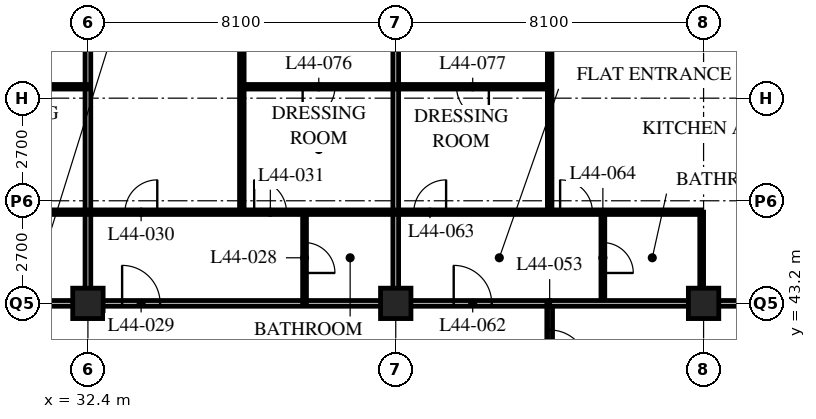
"""IFC4 building model, lengths in metres.
Left out: names, types, materials, properties, quantities, classifications, styles, units other than length and angle.
Written with IfcOpenShell. Run it as: python <this file> out.ifc"""

import sys

from ifc_helpers import new_model, si_unit, direction, frame, frame_2d, origin, origin_2d, place, context, subcontext, project, spatial, rectangle, hollow_rectangle, extrude, element, fill, save


model = new_model("IFC4")
c1 = context("Model", 3, precision=1e-05, world=origin(), true_north=direction((0.0, 1.0)))
c2 = subcontext(c1, "Body", "Model", "MODEL_VIEW")
j1 = project(units=[si_unit("LENGTHUNIT", "METRE"), si_unit("PLANEANGLEUNIT", "RADIAN")], contexts=[c1])
p1 = place(None, origin())
s1 = spatial("IfcSite", under=j1, at=p1, CompositionType="ELEMENT")
p2 = place(p1, origin())
s2 = spatial("IfcBuilding", under=s1, at=p2, CompositionType="ELEMENT")
p3 = place(p2, frame((0.0, 0.0, 174.0)))
s3 = spatial("IfcBuildingStorey", under=s2, at=p3, CompositionType="ELEMENT", Elevation=174.0)
for number, where, z_axis, x_axis in (
    (1, (32.4, 43.2, 0.0), (0.0, 0.0, 1.0), (1.0, 0.0, 0.0)),
    (2, (40.5, 43.2, 0.0), (0.0, 0.0, 1.0), (1.0, 0.0, 0.0)),
    (3, (48.6, 43.2, 0.0), (0.0, 0.0, 1.0), (1.0, 0.0, 0.0)),
):
    element("IfcColumn", number, at=place(p3, frame(where, z_axis=z_axis, x_axis=x_axis)), inside=s3, PredefinedType="COLUMN", context=c2, shape_type="SweptSolid", body=[
        extrude(hollow_rectangle(XDim=0.8, YDim=0.8, WallThickness=0.08, at=origin_2d()), origin(), (0.0, 0.0, 1.0), 3.6),
    ])
p4 = place(p3, frame((12.15, 43.2, 0.0), z_axis=(0.0, 0.0, 1.0), x_axis=(1.0, 0.0, 0.0)))
e4 = element("IfcWall", 4, at=p4, inside=s3, PredefinedType="PARTITIONING", context=c2, shape_type="SweptSolid", body=[
    extrude(rectangle(XDim=32.4, YDim=0.15, at=frame_2d((16.2, 0.0))), origin(), (0.0, 0.0, 1.0), 2.778),
])
p5 = place(p4, frame((4.95, 0.0, 0.0)))
e5 = element("IfcOpeningElement", 5, at=p5, cuts=e4, PredefinedType="OPENING", context=c2, shape_type="SweptSolid", body=[
    extrude(rectangle(XDim=1.0, YDim=2.1, at=frame_2d((0.5, 1.05))), frame((0.0, 0.085, 0.0), z_axis=(0.0, -1.0, 0.0), x_axis=(1.0, 0.0, 0.0)), (0.0, 0.0, 1.0), 0.17),
])
p6 = place(p4, frame((13.05, 0.0, 0.0)))
e6 = element("IfcOpeningElement", 6, at=p6, cuts=e4, PredefinedType="OPENING", context=c2, shape_type="SweptSolid", body=[
    extrude(rectangle(XDim=1.0, YDim=2.1, at=frame_2d((0.5, 1.05))), frame((0.0, 0.085, 0.0), z_axis=(0.0, -1.0, 0.0), x_axis=(1.0, 0.0, 0.0)), (0.0, 0.0, 1.0), 0.17),
])
p7 = place(p4, frame((21.15, 0.0, 0.0)))
e7 = element("IfcOpeningElement", 7, at=p7, cuts=e4, PredefinedType="OPENING", context=c2, shape_type="SweptSolid", body=[
    extrude(rectangle(XDim=1.0, YDim=2.1, at=frame_2d((0.5, 1.05))), frame((0.0, 0.085, 0.0), z_axis=(0.0, -1.0, 0.0), x_axis=(1.0, 0.0, 0.0)), (0.0, 0.0, 1.0), 0.17),
])
p8 = place(p4, frame((29.875, 0.0, 0.0)))
e8 = element("IfcOpeningElement", 8, at=p8, cuts=e4, PredefinedType="OPENING", context=c2, shape_type="SweptSolid", body=[
    extrude(rectangle(XDim=1.0, YDim=2.1, at=frame_2d((0.5, 1.05))), frame((0.0, 0.085, 0.0), z_axis=(0.0, -1.0, 0.0), x_axis=(1.0, 0.0, 0.0)), (0.0, 0.0, 1.0), 0.17),
])
p9 = place(p4, frame((1.525, 0.0, 0.0)))
e9 = element("IfcOpeningElement", 9, at=p9, cuts=e4, PredefinedType="OPENING", context=c2, shape_type="SweptSolid", body=[
    extrude(rectangle(XDim=1.0, YDim=2.1, at=frame_2d((0.5, 1.05))), frame((0.0, 0.085, 0.0), z_axis=(0.0, -1.0, 0.0), x_axis=(1.0, 0.0, 0.0)), (0.0, 0.0, 1.0), 0.17),
])
p10 = place(p3, frame((44.55, 18.9, 0.0), z_axis=(0.0, 0.0, 1.0), x_axis=(0.0, 1.0, 0.0)))
e10 = element("IfcWall", 10, at=p10, inside=s3, PredefinedType="PARTITIONING", context=c2, shape_type="SweptSolid", body=[
    extrude(rectangle(XDim=24.3, YDim=0.15, at=frame_2d((12.15, 0.0))), origin(), (0.0, 0.0, 1.0), 3.39),
])
p11 = place(p10, frame((2.35, 0.0, 0.0)))
e11 = element("IfcOpeningElement", 11, at=p11, cuts=e10, PredefinedType="OPENING", context=c2, shape_type="SweptSolid", body=[
    extrude(rectangle(XDim=1.0, YDim=2.1, at=frame_2d((0.5, 1.05))), frame((0.0, 0.085, 0.0), z_axis=(0.0, -1.0, 0.0), x_axis=(1.0, 0.0, 0.0)), (0.0, 0.0, 1.0), 0.17),
])
p12 = place(p10, frame((4.45, 0.0, 0.0)))
e12 = element("IfcOpeningElement", 12, at=p12, cuts=e10, PredefinedType="OPENING", context=c2, shape_type="SweptSolid", body=[
    extrude(rectangle(XDim=1.0, YDim=2.1, at=frame_2d((0.5, 1.05))), frame((0.0, 0.085, 0.0), z_axis=(0.0, -1.0, 0.0), x_axis=(1.0, 0.0, 0.0)), (0.0, 0.0, 1.0), 0.17),
])
p13 = place(p10, frame((18.55, 0.0, 0.0)))
e13 = element("IfcOpeningElement", 13, at=p13, cuts=e10, PredefinedType="OPENING", context=c2, shape_type="SweptSolid", body=[
    extrude(rectangle(XDim=1.0, YDim=2.1, at=frame_2d((0.5, 1.05))), frame((0.0, 0.085, 0.0), z_axis=(0.0, -1.0, 0.0), x_axis=(1.0, 0.0, 0.0)), (0.0, 0.0, 1.0), 0.17),
])
p14 = place(p10, frame((22.6, 0.0, 0.0)))
e14 = element("IfcOpeningElement", 14, at=p14, cuts=e10, PredefinedType="OPENING", context=c2, shape_type="SweptSolid", body=[
    extrude(rectangle(XDim=1.0, YDim=2.1, at=frame_2d((0.5, 1.05))), frame((0.0, 0.085, 0.0), z_axis=(0.0, -1.0, 0.0), x_axis=(1.0, 0.0, 0.0)), (0.0, 0.0, 1.0), 0.17),
])
p15 = place(p3, frame((32.4, 43.2, 0.0), z_axis=(0.0, 0.0, 1.0), x_axis=(0.0, 1.0, 0.0)))
e15 = element("IfcWall", 15, at=p15, inside=s3, PredefinedType="PARTITIONING", context=c2, shape_type="SweptSolid", body=[
    extrude(rectangle(XDim=15.9, YDim=0.15, at=frame_2d((7.95, 0.0))), origin(), (0.0, 0.0, 1.0), 2.778),
])
p16 = place(p3, frame((38.1, 43.2, 0.0), z_axis=(0.0, 0.0, 1.0), x_axis=(0.0, 1.0, 0.0)))
e16 = element("IfcWall", 16, at=p16, inside=s3, PredefinedType="PARTITIONING", context=c2, shape_type="SweptSolid", body=[
    extrude(rectangle(XDim=2.4, YDim=0.1, at=frame_2d((1.2, 0.0))), origin(), (0.0, 0.0, 1.0), 3.39),
])
p17 = place(p16, frame((0.8, 0.0, 0.0)))
e17 = element("IfcOpeningElement", 17, at=p17, cuts=e16, PredefinedType="OPENING", context=c2, shape_type="SweptSolid", body=[
    extrude(rectangle(XDim=0.8, YDim=2.1, at=frame_2d((0.4, 1.05))), frame((0.0, 0.06, 0.0), z_axis=(0.0, -1.0, 0.0), x_axis=(1.0, 0.0, 0.0)), (0.0, 0.0, 1.0), 0.12),
])
p18 = place(p3, frame((36.45, 45.6, 0.0), z_axis=(0.0, 0.0, 1.0), x_axis=(0.0, 1.0, 0.0)))
e18 = element("IfcWall", 18, at=p18, inside=s3, PredefinedType="PARTITIONING", context=c2, shape_type="SweptSolid", body=[
    extrude(rectangle(XDim=13.5, YDim=0.12, at=frame_2d((6.75, 0.0))), origin(), (0.0, 0.0, 1.0), 3.39),
])
p19 = place(p3, frame((45.95, 43.2, 0.0), z_axis=(0.0, 0.0, 1.0), x_axis=(0.0, 1.0, 0.0)))
e19 = element("IfcWall", 19, at=p19, inside=s3, PredefinedType="PARTITIONING", context=c2, shape_type="SweptSolid", body=[
    extrude(rectangle(XDim=2.4, YDim=0.1, at=frame_2d((1.2, 0.0))), origin(), (0.0, 0.0, 1.0), 3.39),
])
p20 = place(p19, frame((0.8, 0.0, 0.0)))
e20 = element("IfcOpeningElement", 20, at=p20, cuts=e19, PredefinedType="OPENING", context=c2, shape_type="SweptSolid", body=[
    extrude(rectangle(XDim=0.8, YDim=2.1, at=frame_2d((0.4, 1.05))), frame((0.0, 0.06, 0.0), z_axis=(0.0, -1.0, 0.0), x_axis=(1.0, 0.0, 0.0)), (0.0, 0.0, 1.0), 0.12),
])
p21 = place(p3, frame((48.55, 43.2, 0.0), z_axis=(0.0, 0.0, 1.0), x_axis=(0.0, 1.0, 0.0)))
e21 = element("IfcWall", 21, at=p21, inside=s3, PredefinedType="PARTITIONING", context=c2, shape_type="SweptSolid", body=[
    extrude(rectangle(XDim=2.4, YDim=0.1, at=frame_2d((1.2, 0.0))), origin(), (0.0, 0.0, 1.0), 2.778),
])
p22 = place(p3, frame((44.55, 45.6, 0.0), z_axis=(0.0, 0.0, 1.0), x_axis=(0.0, 1.0, 0.0)))
e22 = element("IfcWall", 22, at=p22, inside=s3, PredefinedType="PARTITIONING", context=c2, shape_type="SweptSolid", body=[
    extrude(rectangle(XDim=13.5, YDim=0.12, at=frame_2d((6.75, 0.0))), origin(), (0.0, 0.0, 1.0), 3.39),
])
p23 = place(p3, frame((44.55, 43.2, 0.0), z_axis=(0.0, 0.0, 1.0), x_axis=(1.0, 0.0, 0.0)))
e23 = element("IfcWall", 23, at=p23, inside=s3, PredefinedType="PARTITIONING", context=c2, shape_type="SweptSolid", body=[
    extrude(rectangle(XDim=11.85, YDim=0.15, at=frame_2d((5.925, 0.0))), origin(), (0.0, 0.0, 1.0), 2.778),
])
p24 = place(p3, frame((40.5, 43.2, 0.0), z_axis=(0.0, 0.0, 1.0), x_axis=(0.0, 1.0, 0.0)))
e24 = element("IfcWall", 24, at=p24, inside=s3, PredefinedType="PARTITIONING", context=c2, shape_type="SweptSolid", body=[
    extrude(rectangle(XDim=15.9, YDim=0.15, at=frame_2d((7.95, 0.0))), origin(), (0.0, 0.0, 1.0), 2.778),
])
p25 = place(p3, frame((8.15, 45.6, 0.0), z_axis=(0.0, 0.0, 1.0), x_axis=(1.0, 0.0, 0.0)))
e25 = element("IfcWall", 25, at=p25, inside=s3, PredefinedType="PARTITIONING", context=c2, shape_type="SweptSolid", body=[
    extrude(rectangle(XDim=40.4, YDim=0.12, at=frame_2d((20.2, 0.0))), origin(), (0.0, 0.0, 1.0), 3.39),
])
p26 = place(p25, frame((9.025, 0.0, 0.0)))
e26 = element("IfcOpeningElement", 26, at=p26, cuts=e25, PredefinedType="OPENING", context=c2, shape_type="SweptSolid", body=[
    extrude(rectangle(XDim=0.85, YDim=2.1, at=frame_2d((0.425, 1.05))), frame((0.0, 0.07, 0.0), z_axis=(0.0, -1.0, 0.0), x_axis=(1.0, 0.0, 0.0)), (0.0, 0.0, 1.0), 0.14),
])
p27 = place(p25, frame((12.425, 0.0, 0.0)))
e27 = element("IfcOpeningElement", 27, at=p27, cuts=e25, PredefinedType="OPENING", context=c2, shape_type="SweptSolid", body=[
    extrude(rectangle(XDim=0.85, YDim=2.1, at=frame_2d((0.425, 1.05))), frame((0.0, 0.07, 0.0), z_axis=(0.0, -1.0, 0.0), x_axis=(1.0, 0.0, 0.0)), (0.0, 0.0, 1.0), 0.14),
])
p28 = place(p25, frame((17.125, 0.0, 0.0)))
e28 = element("IfcOpeningElement", 28, at=p28, cuts=e25, PredefinedType="OPENING", context=c2, shape_type="SweptSolid", body=[
    extrude(rectangle(XDim=0.85, YDim=2.1, at=frame_2d((0.425, 1.05))), frame((0.0, 0.07, 0.0), z_axis=(0.0, -1.0, 0.0), x_axis=(1.0, 0.0, 0.0)), (0.0, 0.0, 1.0), 0.14),
])
p29 = place(p25, frame((20.525, 0.0, 0.0)))
e29 = element("IfcOpeningElement", 29, at=p29, cuts=e25, PredefinedType="OPENING", context=c2, shape_type="SweptSolid", body=[
    extrude(rectangle(XDim=0.85, YDim=2.1, at=frame_2d((0.425, 1.05))), frame((0.0, 0.07, 0.0), z_axis=(0.0, -1.0, 0.0), x_axis=(1.0, 0.0, 0.0)), (0.0, 0.0, 1.0), 0.14),
])
p30 = place(p25, frame((25.225, 0.0, 0.0)))
e30 = element("IfcOpeningElement", 30, at=p30, cuts=e25, PredefinedType="OPENING", context=c2, shape_type="SweptSolid", body=[
    extrude(rectangle(XDim=0.85, YDim=2.1, at=frame_2d((0.425, 1.05))), frame((0.0, 0.07, 0.0), z_axis=(0.0, -1.0, 0.0), x_axis=(1.0, 0.0, 0.0)), (0.0, 0.0, 1.0), 0.14),
])
p31 = place(p25, frame((28.625, 0.0, 0.0)))
e31 = element("IfcOpeningElement", 31, at=p31, cuts=e25, PredefinedType="OPENING", context=c2, shape_type="SweptSolid", body=[
    extrude(rectangle(XDim=0.85, YDim=2.1, at=frame_2d((0.425, 1.05))), frame((0.0, 0.07, 0.0), z_axis=(0.0, -1.0, 0.0), x_axis=(1.0, 0.0, 0.0)), (0.0, 0.0, 1.0), 0.14),
])
p32 = place(p25, frame((32.825, 0.0, 0.0)))
e32 = element("IfcOpeningElement", 32, at=p32, cuts=e25, PredefinedType="OPENING", context=c2, shape_type="SweptSolid", body=[
    extrude(rectangle(XDim=0.85, YDim=2.1, at=frame_2d((0.425, 1.05))), frame((0.0, 0.07, 0.0), z_axis=(0.0, -1.0, 0.0), x_axis=(1.0, 0.0, 0.0)), (0.0, 0.0, 1.0), 0.14),
])
p33 = place(p25, frame((36.675, 0.0, 0.0)))
e33 = element("IfcOpeningElement", 33, at=p33, cuts=e25, PredefinedType="OPENING", context=c2, shape_type="SweptSolid", body=[
    extrude(rectangle(XDim=0.85, YDim=2.1, at=frame_2d((0.425, 1.05))), frame((0.0, 0.07, 0.0), z_axis=(0.0, -1.0, 0.0), x_axis=(1.0, 0.0, 0.0)), (0.0, 0.0, 1.0), 0.14),
])
p34 = place(p25, frame((6.725, 0.0, 0.0)))
e34 = element("IfcOpeningElement", 34, at=p34, cuts=e25, PredefinedType="OPENING", context=c2, shape_type="SweptSolid", body=[
    extrude(rectangle(XDim=0.85, YDim=2.1, at=frame_2d((0.425, 1.05))), frame((0.0, 0.07, 0.0), z_axis=(0.0, -1.0, 0.0), x_axis=(1.0, 0.0, 0.0)), (0.0, 0.0, 1.0), 0.14),
])
p35 = place(p25, frame((2.875, 0.0, 0.0)))
e35 = element("IfcOpeningElement", 35, at=p35, cuts=e25, PredefinedType="OPENING", context=c2, shape_type="SweptSolid", body=[
    extrude(rectangle(XDim=0.85, YDim=2.1, at=frame_2d((0.425, 1.05))), frame((0.0, 0.07, 0.0), z_axis=(0.0, -1.0, 0.0), x_axis=(1.0, 0.0, 0.0)), (0.0, 0.0, 1.0), 0.14),
])
p36 = place(p3, frame((28.35, 48.9, 0.0), z_axis=(0.0, 0.0, 1.0), x_axis=(1.0, 0.0, 0.0)))
e36 = element("IfcWall", 36, at=p36, inside=s3, PredefinedType="PARTITIONING", context=c2, shape_type="SweptSolid", body=[
    extrude(rectangle(XDim=4.05, YDim=0.12, at=frame_2d((2.025, 0.0))), origin(), (0.0, 0.0, 1.0), 3.39),
])
p37 = place(p36, frame((1.6, 0.0, 0.0)))
e37 = element("IfcOpeningElement", 37, at=p37, cuts=e36, PredefinedType="OPENING", context=c2, shape_type="SweptSolid", body=[
    extrude(rectangle(XDim=0.85, YDim=2.1, at=frame_2d((0.425, 1.05))), frame((0.0, 0.07, 0.0), z_axis=(0.0, -1.0, 0.0), x_axis=(1.0, 0.0, 0.0)), (0.0, 0.0, 1.0), 0.14),
])
p38 = place(p3, frame((36.45, 48.9, 0.0), z_axis=(0.0, 0.0, 1.0), x_axis=(1.0, 0.0, 0.0)))
e38 = element("IfcWall", 38, at=p38, inside=s3, PredefinedType="PARTITIONING", context=c2, shape_type="SweptSolid", body=[
    extrude(rectangle(XDim=8.1, YDim=0.12, at=frame_2d((4.05, 0.0))), origin(), (0.0, 0.0, 1.0), 3.39),
])
p39 = place(p38, frame((1.6, 0.0, 0.0)))
e39 = element("IfcOpeningElement", 39, at=p39, cuts=e38, PredefinedType="OPENING", context=c2, shape_type="SweptSolid", body=[
    extrude(rectangle(XDim=0.85, YDim=2.1, at=frame_2d((0.425, 1.05))), frame((0.0, 0.07, 0.0), z_axis=(0.0, -1.0, 0.0), x_axis=(1.0, 0.0, 0.0)), (0.0, 0.0, 1.0), 0.14),
])
p40 = place(p38, frame((5.65, 0.0, 0.0)))
e40 = element("IfcOpeningElement", 40, at=p40, cuts=e38, PredefinedType="OPENING", context=c2, shape_type="SweptSolid", body=[
    extrude(rectangle(XDim=0.85, YDim=2.1, at=frame_2d((0.425, 1.05))), frame((0.0, 0.07, 0.0), z_axis=(0.0, -1.0, 0.0), x_axis=(1.0, 0.0, 0.0)), (0.0, 0.0, 1.0), 0.14),
])
p41 = place(p17, origin())
e41 = element("IfcDoor", 41, at=p41, inside=s3, OperationType="SINGLE_SWING_RIGHT", PredefinedType="DOOR", context=c2, shape_type="SweptSolid", body=[
    extrude(rectangle(XDim=0.8, YDim=2.1, at=frame_2d((0.4, 1.05))), frame((0.0, 0.025, 0.0), z_axis=(0.0, -1.0, 0.0), x_axis=(1.0, 0.0, 0.0)), (0.0, 0.0, 1.0), 0.05),
])
fill(e17, e41)
p42 = place(p7, origin())
e42 = element("IfcDoor", 42, at=p42, inside=s3, OperationType="SINGLE_SWING_LEFT", PredefinedType="DOOR", context=c2, shape_type="SweptSolid", body=[
    extrude(rectangle(XDim=1.0, YDim=2.1, at=frame_2d((0.5, 1.05))), frame((0.0, 0.025, 0.0), z_axis=(0.0, -1.0, 0.0), x_axis=(1.0, 0.0, 0.0)), (0.0, 0.0, 1.0), 0.05),
])
fill(e7, e42)
p43 = place(p30, origin())
e43 = element("IfcDoor", 43, at=p43, inside=s3, OperationType="SINGLE_SWING_RIGHT", PredefinedType="DOOR", context=c2, shape_type="SweptSolid", body=[
    extrude(rectangle(XDim=0.85, YDim=2.1, at=frame_2d((0.425, 1.05))), frame((0.0, 0.025, 0.0), z_axis=(0.0, -1.0, 0.0), x_axis=(1.0, 0.0, 0.0)), (0.0, 0.0, 1.0), 0.05),
])
fill(e30, e43)
p44 = place(p31, origin())
e44 = element("IfcDoor", 44, at=p44, inside=s3, OperationType="SINGLE_SWING_LEFT", PredefinedType="DOOR", context=c2, shape_type="SweptSolid", body=[
    extrude(rectangle(XDim=0.85, YDim=2.1, at=frame_2d((0.425, 1.05))), frame((0.0, 0.025, 0.0), z_axis=(0.0, -1.0, 0.0), x_axis=(1.0, 0.0, 0.0)), (0.0, 0.0, 1.0), 0.05),
])
fill(e31, e44)
p45 = place(p14, origin())
e45 = element("IfcDoor", 45, at=p45, inside=s3, OperationType="SINGLE_SWING_RIGHT", PredefinedType="DOOR", context=c2, shape_type="SweptSolid", body=[
    extrude(rectangle(XDim=1.0, YDim=2.1, at=frame_2d((0.5, 1.05))), frame((0.0, 0.025, 0.0), z_axis=(0.0, -1.0, 0.0), x_axis=(1.0, 0.0, 0.0)), (0.0, 0.0, 1.0), 0.05),
])
fill(e14, e45)
p46 = place(p8, origin())
e46 = element("IfcDoor", 46, at=p46, inside=s3, OperationType="SINGLE_SWING_LEFT", PredefinedType="DOOR", context=c2, shape_type="SweptSolid", body=[
    extrude(rectangle(XDim=1.0, YDim=2.1, at=frame_2d((0.5, 1.05))), frame((0.0, 0.025, 0.0), z_axis=(0.0, -1.0, 0.0), x_axis=(1.0, 0.0, 0.0)), (0.0, 0.0, 1.0), 0.05),
])
fill(e8, e46)
p47 = place(p32, origin())
e47 = element("IfcDoor", 47, at=p47, inside=s3, OperationType="SINGLE_SWING_RIGHT", PredefinedType="DOOR", context=c2, shape_type="SweptSolid", body=[
    extrude(rectangle(XDim=0.85, YDim=2.1, at=frame_2d((0.425, 1.05))), frame((0.0, 0.025, 0.0), z_axis=(0.0, -1.0, 0.0), x_axis=(1.0, 0.0, 0.0)), (0.0, 0.0, 1.0), 0.05),
])
fill(e32, e47)
p48 = place(p20, origin())
e48 = element("IfcDoor", 48, at=p48, inside=s3, OperationType="SINGLE_SWING_RIGHT", PredefinedType="DOOR", context=c2, shape_type="SweptSolid", body=[
    extrude(rectangle(XDim=0.8, YDim=2.1, at=frame_2d((0.4, 1.05))), frame((0.0, 0.025, 0.0), z_axis=(0.0, -1.0, 0.0), x_axis=(1.0, 0.0, 0.0)), (0.0, 0.0, 1.0), 0.05),
])
fill(e20, e48)
p49 = place(p33, origin())
e49 = element("IfcDoor", 49, at=p49, inside=s3, OperationType="SINGLE_SWING_LEFT", PredefinedType="DOOR", context=c2, shape_type="SweptSolid", body=[
    extrude(rectangle(XDim=0.85, YDim=2.1, at=frame_2d((0.425, 1.05))), frame((0.0, 0.025, 0.0), z_axis=(0.0, -1.0, 0.0), x_axis=(1.0, 0.0, 0.0)), (0.0, 0.0, 1.0), 0.05),
])
fill(e33, e49)
p50 = place(p39, origin())
e50 = element("IfcDoor", 50, at=p50, inside=s3, OperationType="SINGLE_SWING_RIGHT", PredefinedType="DOOR", context=c2, shape_type="SweptSolid", body=[
    extrude(rectangle(XDim=0.85, YDim=2.1, at=frame_2d((0.425, 1.05))), frame((0.0, 0.025, 0.0), z_axis=(0.0, -1.0, 0.0), x_axis=(1.0, 0.0, 0.0)), (0.0, 0.0, 1.0), 0.05),
])
fill(e39, e50)
p51 = place(p40, origin())
e51 = element("IfcDoor", 51, at=p51, inside=s3, OperationType="SINGLE_SWING_LEFT", PredefinedType="DOOR", context=c2, shape_type="SweptSolid", body=[
    extrude(rectangle(XDim=0.85, YDim=2.1, at=frame_2d((0.425, 1.05))), frame((0.0, 0.025, 0.0), z_axis=(0.0, -1.0, 0.0), x_axis=(1.0, 0.0, 0.0)), (0.0, 0.0, 1.0), 0.05),
])
fill(e40, e51)
save(model, sys.argv[1])
